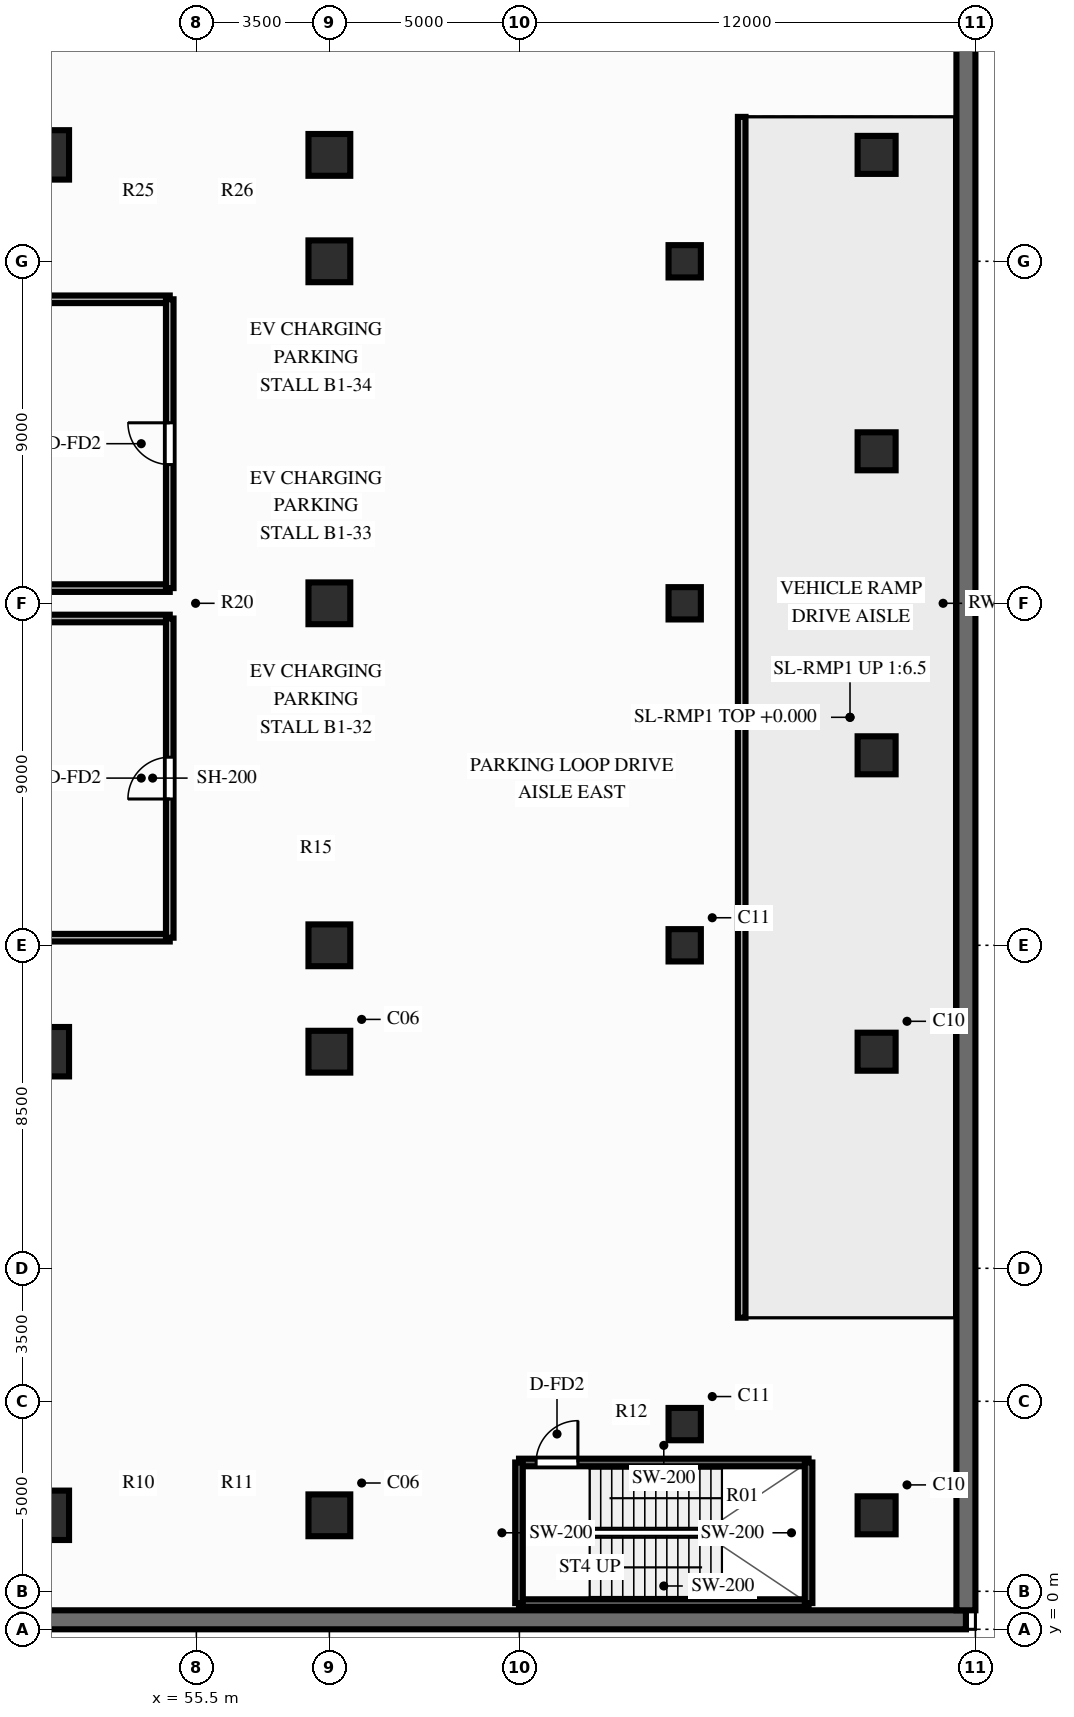
"""IFC4 building model, lengths in metres.
Left out: names, types, materials, properties, quantities, classifications, styles, units other than length and angle.
Written with IfcOpenShell. Run it as: python <this file> out.ifc"""

import sys

from ifc_helpers import new_model, si_unit, direction, frame, frame_2d, origin, origin_2d, place, context, subcontext, project, spatial, rectangle, circle, extrude, source, transform, mapped, element, fill, save


model = new_model("IFC4")
c1 = context("Model", 3, precision=1e-05, world=origin(), true_north=direction((0.0, 1.0)))
c2 = subcontext(c1, "Body", "Model", "MODEL_VIEW")
j1 = project(units=[si_unit("LENGTHUNIT", "METRE"), si_unit("PLANEANGLEUNIT", "RADIAN")], contexts=[c1])
p1 = place(None, origin())
s1 = spatial("IfcSite", under=j1, at=p1, CompositionType="ELEMENT")
p2 = place(p1, origin())
s2 = spatial("IfcBuilding", under=s1, at=p2, CompositionType="ELEMENT")
p3 = place(p2, frame((0.0, 0.0, -4.6)))
s3 = spatial("IfcBuildingStorey", under=s2, at=p3, CompositionType="ELEMENT", Elevation=-4.6)
p4 = place(p3, frame((0.25, 0.25, 0.0), z_axis=(0.0, 0.0, 1.0), x_axis=(1.0, 0.0, 0.0)))
e1 = element("IfcWall", 1, at=p4, inside=s3, PredefinedType="USERDEFINED", context=c2, shape_type="SweptSolid", body=[
    extrude(rectangle(XDim=75.5, YDim=0.5, at=frame_2d((37.75, 0.0))), origin(), (0.0, 0.0, 1.0), 4.6),
])
p5 = place(p3, frame((75.75, 0.5, 0.0), z_axis=(0.0, 0.0, 1.0), x_axis=(0.0, 1.0, 0.0)))
e2 = element("IfcWall", 2, at=p5, inside=s3, PredefinedType="USERDEFINED", context=c2, shape_type="SweptSolid", body=[
    extrude(rectangle(XDim=53.0, YDim=0.5, at=frame_2d((26.5, 0.0))), origin(), (0.0, 0.0, 1.0), 4.6),
])
m1 = source(origin(), c2, "Body", "SweptSolid", [
    extrude(circle(Radius=0.5, at=origin_2d()), origin(), (0.0, 0.0, 1.0), 4.6),
])
for number, where, z_axis, x_axis in (
    (3, (73.4, 3.0, 0.0), (0.0, 0.0, 1.0), (1.0, 0.0, 0.0)),
    (4, (73.4, 15.2, 0.0), (0.0, 0.0, 1.0), (1.0, 0.0, 0.0)),
    (5, (73.4, 23.0, 0.0), (0.0, 0.0, 1.0), (1.0, 0.0, 0.0)),
    (6, (73.4, 31.0, 0.0), (0.0, 0.0, 1.0), (1.0, 0.0, 0.0)),
    (7, (73.4, 38.8, 0.0), (0.0, 0.0, 1.0), (1.0, 0.0, 0.0)),
):
    element("IfcColumn", number, at=place(p3, frame(where, z_axis=z_axis, x_axis=x_axis)), inside=s3, PredefinedType="COLUMN", context=c2, shape_type="MappedRepresentation", body=[
        mapped(m1, transform((0.0, 0.0, 0.0), scale=1.0)),
    ])
m2 = source(origin(), c2, "Body", "SweptSolid", [
    extrude(circle(Radius=0.425, at=origin_2d()), origin(), (0.0, 0.0, 1.0), 4.6),
])
for number, where, z_axis, x_axis in (
    (8, (68.35, 5.4, 0.0), (0.0, 0.0, 1.0), (1.0, 0.0, 0.0)),
    (9, (68.35, 18.0, 0.0), (0.0, 0.0, 1.0), (1.0, 0.0, 0.0)),
    (10, (68.35, 27.0, 0.0), (0.0, 0.0, 1.0), (1.0, 0.0, 0.0)),
    (11, (68.35, 36.0, 0.0), (0.0, 0.0, 1.0), (1.0, 0.0, 0.0)),
):
    element("IfcColumn", number, at=place(p3, frame(where, z_axis=z_axis, x_axis=x_axis)), inside=s3, PredefinedType="COLUMN", context=c2, shape_type="MappedRepresentation", body=[
        mapped(m2, transform((0.0, 0.0, 0.0), scale=1.0)),
    ])
m3 = source(origin(), c2, "Body", "SweptSolid", [
    extrude(rectangle(XDim=1.1, YDim=1.1, at=origin_2d()), origin(), (0.0, 0.0, 1.0), 4.6),
])
for number, where, z_axis, x_axis in (
    (12, (59.0, 3.0, 0.0), (0.0, 0.0, 1.0), (1.0, 0.0, 0.0)),
    (13, (59.0, 15.2, 0.0), (0.0, 0.0, 1.0), (1.0, 0.0, 0.0)),
    (14, (59.0, 18.0, 0.0), (0.0, 0.0, 1.0), (1.0, 0.0, 0.0)),
    (15, (59.0, 27.0, 0.0), (0.0, 0.0, 1.0), (1.0, 0.0, 0.0)),
    (16, (59.0, 36.0, 0.0), (0.0, 0.0, 1.0), (1.0, 0.0, 0.0)),
    (17, (59.0, 38.8, 0.0), (0.0, 0.0, 1.0), (1.0, 0.0, 0.0)),
):
    element("IfcColumn", number, at=place(p3, frame(where, z_axis=z_axis, x_axis=x_axis)), inside=s3, PredefinedType="COLUMN", context=c2, shape_type="MappedRepresentation", body=[
        mapped(m3, transform((0.0, 0.0, 0.0), scale=1.0)),
    ])
m4 = source(origin(), c2, "Body", "SweptSolid", [
    extrude(rectangle(XDim=1.3, YDim=1.3, at=origin_2d()), origin(), (0.0, 0.0, 1.0), 4.6),
])
for number, where, z_axis, x_axis in (
    (18, (51.5, 3.0, 0.0), (0.0, 0.0, 1.0), (1.0, 0.0, 0.0)),
    (19, (51.5, 15.2, 0.0), (0.0, 0.0, 1.0), (1.0, 0.0, 0.0)),
    (20, (51.5, 38.8, 0.0), (0.0, 0.0, 1.0), (1.0, 0.0, 0.0)),
):
    element("IfcColumn", number, at=place(p3, frame(where, z_axis=z_axis, x_axis=x_axis)), inside=s3, PredefinedType="COLUMN", context=c2, shape_type="MappedRepresentation", body=[
        mapped(m4, transform((0.0, 0.0, 0.0), scale=1.0)),
    ])
p6 = place(p3, frame((63.99, 0.69, 0.0), z_axis=(0.0, 0.0, 1.0), x_axis=(1.0, 0.0, 0.0)))
e21 = element("IfcWall", 21, at=p6, inside=s3, PredefinedType="SOLIDWALL", context=c2, shape_type="SweptSolid", body=[
    extrude(rectangle(XDim=7.62, YDim=0.2, at=frame_2d((3.81, 0.0))), origin(), (0.0, 0.0, 1.0), 4.32),
])
p7 = place(p3, frame((63.99, 4.39, 0.0), z_axis=(0.0, 0.0, 1.0), x_axis=(1.0, 0.0, 0.0)))
e22 = element("IfcWall", 22, at=p7, inside=s3, PredefinedType="SOLIDWALL", context=c2, shape_type="SweptSolid", body=[
    extrude(rectangle(XDim=7.62, YDim=0.2, at=frame_2d((3.81, 0.0))), origin(), (0.0, 0.0, 1.0), 4.32),
])
p8 = place(p7, frame((0.45, 0.0, 0.0)))
e23 = element("IfcOpeningElement", 23, at=p8, cuts=e22, PredefinedType="OPENING", context=c2, shape_type="SweptSolid", body=[
    extrude(rectangle(XDim=1.1, YDim=2.15, at=frame_2d((0.55, 1.075))), frame((0.0, 0.112, 0.0), z_axis=(0.0, -1.0, 0.0), x_axis=(1.0, 0.0, 0.0)), (0.0, 0.0, 1.0), 0.224),
])
for number, where, z_axis, x_axis in (
    (24, (63.99, 0.69, 0.0), (0.0, 0.0, 1.0), (0.0, 1.0, 0.0)),
    (25, (71.61, 0.69, 0.0), (0.0, 0.0, 1.0), (0.0, 1.0, 0.0)),
):
    element("IfcWall", number, at=place(p3, frame(where, z_axis=z_axis, x_axis=x_axis)), inside=s3, PredefinedType="SOLIDWALL", context=c2, shape_type="SweptSolid", body=[
        extrude(rectangle(XDim=3.7, YDim=0.2, at=frame_2d((1.85, 0.0))), origin(), (0.0, 0.0, 1.0), 4.32),
    ])
p9 = place(p3, frame((69.85, 8.2, 0.0), z_axis=(0.0, 0.0, 1.0), x_axis=(0.0, 1.0, 0.0)))
e26 = element("IfcWall", 26, at=p9, inside=s3, PredefinedType="PARTITIONING", context=c2, shape_type="SweptSolid", body=[
    extrude(rectangle(XDim=31.6, YDim=0.2, at=frame_2d((15.8, 0.0))), origin(), (0.0, 0.0, 1.0), 4.32),
])
for number, where, z_axis, x_axis in (
    (27, (47.1, 18.2, 0.0), (0.0, 0.0, 1.0), (1.0, 0.0, 0.0)),
    (28, (47.1, 26.6, 0.0), (0.0, 0.0, 1.0), (1.0, 0.0, 0.0)),
):
    element("IfcWall", number, at=place(p3, frame(where, z_axis=z_axis, x_axis=x_axis)), inside=s3, PredefinedType="PARTITIONING", context=c2, shape_type="SweptSolid", body=[
        extrude(rectangle(XDim=7.7, YDim=0.2, at=frame_2d((3.85, 0.0))), origin(), (0.0, 0.0, 1.0), 4.32),
    ])
p10 = place(p3, frame((54.8, 18.2, 0.0), z_axis=(0.0, 0.0, 1.0), x_axis=(0.0, 1.0, 0.0)))
e29 = element("IfcWall", 29, at=p10, inside=s3, PredefinedType="PARTITIONING", context=c2, shape_type="SweptSolid", body=[
    extrude(rectangle(XDim=8.4, YDim=0.2, at=frame_2d((4.2, 0.0))), origin(), (0.0, 0.0, 1.0), 4.32),
])
p11 = place(p10, frame((3.65, 0.0, 0.0)))
e30 = element("IfcOpeningElement", 30, at=p11, cuts=e29, PredefinedType="OPENING", context=c2, shape_type="SweptSolid", body=[
    extrude(rectangle(XDim=1.1, YDim=2.15, at=frame_2d((0.55, 1.075))), frame((0.0, 0.112, 0.0), z_axis=(0.0, -1.0, 0.0), x_axis=(1.0, 0.0, 0.0)), (0.0, 0.0, 1.0), 0.224),
])
for number, where, z_axis, x_axis in (
    (31, (47.1, 27.4, 0.0), (0.0, 0.0, 1.0), (1.0, 0.0, 0.0)),
    (32, (47.1, 35.0, 0.0), (0.0, 0.0, 1.0), (1.0, 0.0, 0.0)),
):
    element("IfcWall", number, at=place(p3, frame(where, z_axis=z_axis, x_axis=x_axis)), inside=s3, PredefinedType="PARTITIONING", context=c2, shape_type="SweptSolid", body=[
        extrude(rectangle(XDim=7.7, YDim=0.2, at=frame_2d((3.85, 0.0))), origin(), (0.0, 0.0, 1.0), 4.32),
    ])
p12 = place(p3, frame((54.8, 27.4, 0.0), z_axis=(0.0, 0.0, 1.0), x_axis=(0.0, 1.0, 0.0)))
e33 = element("IfcWall", 33, at=p12, inside=s3, PredefinedType="PARTITIONING", context=c2, shape_type="SweptSolid", body=[
    extrude(rectangle(XDim=7.6, YDim=0.2, at=frame_2d((3.8, 0.0))), origin(), (0.0, 0.0, 1.0), 4.32),
])
p13 = place(p12, frame((3.25, 0.0, 0.0)))
e34 = element("IfcOpeningElement", 34, at=p13, cuts=e33, PredefinedType="OPENING", context=c2, shape_type="SweptSolid", body=[
    extrude(rectangle(XDim=1.1, YDim=2.15, at=frame_2d((0.55, 1.075))), frame((0.0, 0.112, 0.0), z_axis=(0.0, -1.0, 0.0), x_axis=(1.0, 0.0, 0.0)), (0.0, 0.0, 1.0), 0.224),
])
m5 = source(origin(), c2, "Body", "SweptSolid", [
    extrude(rectangle(XDim=1.1, YDim=2.15, at=frame_2d((0.55, 1.075))), frame((0.0, 0.025, 0.0), z_axis=(0.0, -1.0, 0.0), x_axis=(1.0, 0.0, 0.0)), (0.0, 0.0, 1.0), 0.05),
])
p14 = place(p8, origin())
e35 = element("IfcDoor", 35, at=p14, inside=s3, OperationType="SINGLE_SWING_RIGHT", PredefinedType="DOOR", context=c2, shape_type="MappedRepresentation", body=[
    mapped(m5, transform((0.0, 0.0, 0.0), scale=1.0)),
])
fill(e23, e35)
p15 = place(p11, origin())
e36 = element("IfcDoor", 36, at=p15, inside=s3, OperationType="SINGLE_SWING_LEFT", PredefinedType="DOOR", context=c2, shape_type="MappedRepresentation", body=[
    mapped(m5, transform((0.0, 0.0, 0.0), scale=1.0)),
])
fill(e30, e36)
p16 = place(p13, origin())
e37 = element("IfcDoor", 37, at=p16, inside=s3, OperationType="SINGLE_SWING_RIGHT", PredefinedType="DOOR", context=c2, shape_type="MappedRepresentation", body=[
    mapped(m5, transform((0.0, 0.0, 0.0), scale=1.0)),
])
fill(e34, e37)
save(model, sys.argv[1])
